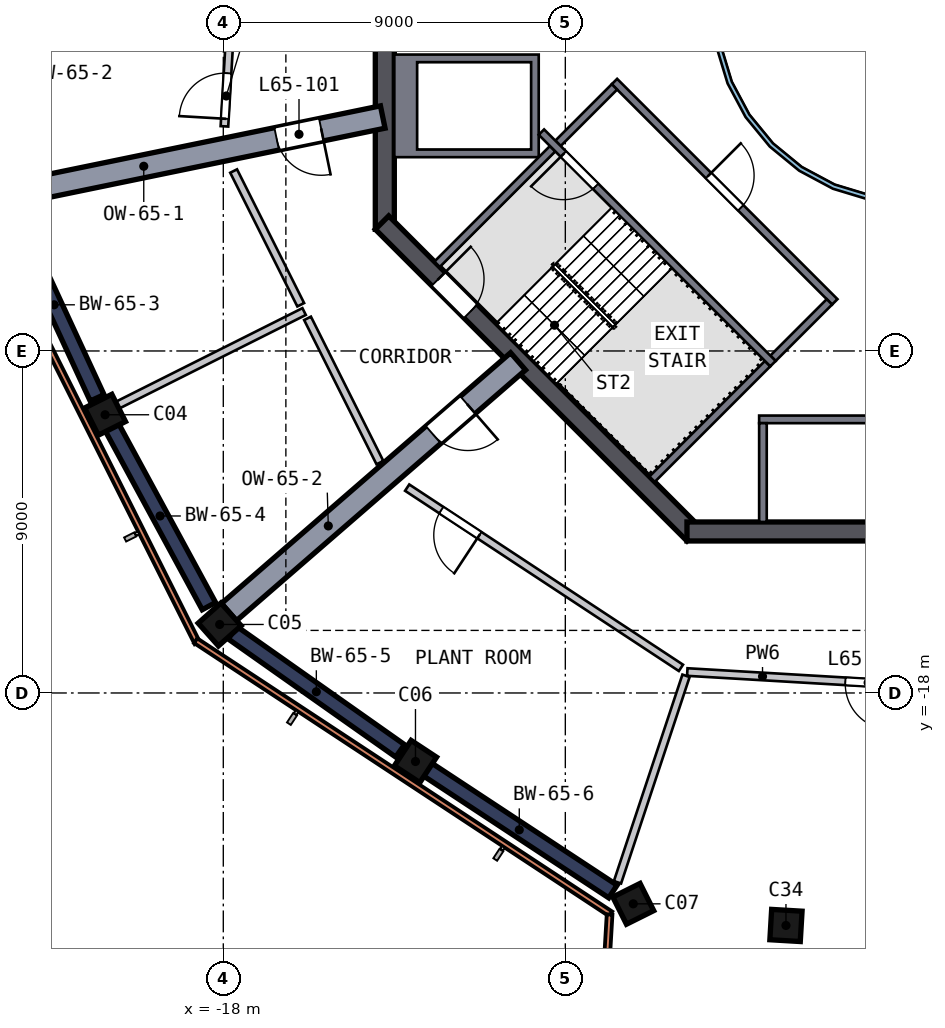
"""IFC4 building model, lengths in metres.
Left out: names, types, materials, properties, quantities, classifications, styles, units other than length and angle.
Written with IfcOpenShell. Run it as: python <this file> out.ifc"""

import sys

from ifc_helpers import new_model, si_unit, direction, frame, frame_2d, origin, origin_2d, place, context, subcontext, project, spatial, polyline, rectangle, outline, extrude, element, fill, save


model = new_model("IFC4")
c1 = context("Model", 3, precision=1e-05, world=origin(), true_north=direction((0.0, 1.0)))
c2 = subcontext(c1, "Body", "Model", "MODEL_VIEW")
j1 = project(units=[si_unit("LENGTHUNIT", "METRE"), si_unit("PLANEANGLEUNIT", "RADIAN")], contexts=[c1])
p1 = place(None, origin())
s1 = spatial("IfcSite", under=j1, at=p1, CompositionType="ELEMENT")
p2 = place(p1, origin())
s2 = spatial("IfcBuilding", under=s1, at=p2, CompositionType="ELEMENT")
p3 = place(p2, frame((0.0, 0.0, 263.0)))
s3 = spatial("IfcBuildingStorey", under=s2, at=p3, CompositionType="ELEMENT", Elevation=263.0)
p4 = place(p3, frame((-21.147, -10.608, 0.0), z_axis=(0.03004517, -0.058682818, 0.997824441), x_axis=(0.447253105, -0.891974541, -0.065924798)))
e1 = element("IfcColumn", 1, at=p4, inside=s3, PredefinedType="COLUMN", context=c2, shape_type="SweptSolid", body=[
    extrude(rectangle(XDim=0.8, YDim=0.8, at=origin_2d()), origin(), (0.0, 0.0, 1.0), 4.51),
])
p5 = place(p3, frame((-18.15, -16.137, 0.0), z_axis=(0.045360282, -0.050177782, 0.997709695), x_axis=(-0.662810667, 0.745725805, 0.06763906)))
e2 = element("IfcColumn", 2, at=p5, inside=s3, PredefinedType="COLUMN", context=c2, shape_type="SweptSolid", body=[
    extrude(rectangle(XDim=0.8, YDim=0.8, at=origin_2d()), origin(), (0.0, 0.0, 1.0), 4.51),
])
p6 = place(p3, frame((-13.01, -19.76, 0.0), z_axis=(0.055380526, -0.035783507, 0.997823901), x_axis=(0.833509154, -0.548557504, -0.065932963)))
e3 = element("IfcColumn", 3, at=p6, inside=s3, PredefinedType="COLUMN", context=c2, shape_type="SweptSolid", body=[
    extrude(rectangle(XDim=0.8, YDim=0.8, at=origin_2d()), origin(), (0.0, 0.0, 1.0), 4.51),
])
p7 = place(p3, frame((-7.291, -23.525, 0.0), z_axis=(0.065708422, -0.019809953, 0.997642205), x_axis=(-0.445205998, 0.894189701, 0.047078641)))
e4 = element("IfcColumn", 4, at=p7, inside=s3, PredefinedType="COLUMN", context=c2, shape_type="SweptSolid", body=[
    extrude(rectangle(XDim=0.8, YDim=0.8, at=origin_2d()), origin(), (0.0, 0.0, 1.0), 4.511),
])
p8 = place(p3, frame((-3.275, -24.108, 0.0), z_axis=(0.067227899, -0.008552341, 0.997700991), x_axis=(-0.058810987, -0.998258564, -0.004594271)))
e5 = element("IfcColumn", 5, at=p8, inside=s3, PredefinedType="COLUMN", context=c2, shape_type="SweptSolid", body=[
    extrude(rectangle(XDim=0.8, YDim=0.8, at=origin_2d()), origin(), (0.0, 0.0, 1.0), 4.51),
])
p9 = place(p3, frame((-13.75, 5.799, 0.0), z_axis=(0.0, 0.0, 1.0), x_axis=(0.0, -1.0, 0.0)))
e6 = element("IfcWall", 6, at=p9, inside=s3, PredefinedType="SHEAR", context=c2, shape_type="SweptSolid", body=[
    extrude(rectangle(XDim=11.598, YDim=0.5, at=frame_2d((5.799, 0.0))), origin(), (0.0, 0.0, 1.0), 6.0),
])
p10 = place(p9, frame((4.899, 0.0, 0.0)))
e7 = element("IfcOpeningElement", 7, at=p10, cuts=e6, PredefinedType="OPENING", context=c2, shape_type="SweptSolid", body=[
    extrude(rectangle(XDim=1.8, YDim=2.1, at=frame_2d((0.9, 1.05))), frame((0.0, 0.26, 0.0), z_axis=(0.0, -1.0, 0.0), x_axis=(1.0, 0.0, 0.0)), (0.0, 0.0, 1.0), 0.52),
])
p11 = place(p3, frame((-13.823, -5.622, 0.0), z_axis=(0.0, 0.0, 1.0), x_axis=(0.707106781, -0.707106781, 0.0)))
e8 = element("IfcWall", 8, at=p11, inside=s3, PredefinedType="SHEAR", context=c2, shape_type="SweptSolid", body=[
    extrude(rectangle(XDim=11.598, YDim=0.5, at=frame_2d((5.799, 0.0))), origin(), (0.0, 0.0, 1.0), 6.0),
])
p12 = place(p11, frame((2.099, 0.0, 0.0)))
e9 = element("IfcOpeningElement", 9, at=p12, cuts=e8, PredefinedType="OPENING", context=c2, shape_type="SweptSolid", body=[
    extrude(rectangle(XDim=1.2, YDim=2.1, at=frame_2d((0.6, 1.05))), frame((0.0, 0.26, 0.0), z_axis=(0.0, -1.0, 0.0), x_axis=(1.0, 0.0, 0.0)), (0.0, 0.0, 1.0), 0.52),
])
p13 = place(p3, frame((-5.799, -13.75, 0.0), z_axis=(0.0, 0.0, 1.0), x_axis=(1.0, 0.0, 0.0)))
e10 = element("IfcWall", 10, at=p13, inside=s3, PredefinedType="SHEAR", context=c2, shape_type="SweptSolid", body=[
    extrude(rectangle(XDim=11.598, YDim=0.5, at=frame_2d((5.799, 0.0))), origin(), (0.0, 0.0, 1.0), 6.0),
])
p14 = place(p3, frame((-23.585, -5.336, 0.0), z_axis=(0.0, 0.0, 1.0), x_axis=(0.419749551, -0.90763997, 0.0)))
e11 = element("IfcWall", 11, at=p14, inside=s3, PredefinedType="SHEAR", context=c2, shape_type="SweptSolid", body=[
    extrude(rectangle(XDim=5.396, YDim=0.4, at=frame_2d((2.698, 0.0))), origin(), (0.0, 0.0, 1.0), 4.5),
])
p15 = place(p3, frame((-20.95, -10.971, 0.0), z_axis=(0.0, 0.0, 1.0), x_axis=(0.476596513, -0.879122155, 0.0)))
e12 = element("IfcWall", 12, at=p15, inside=s3, PredefinedType="SHEAR", context=c2, shape_type="SweptSolid", body=[
    extrude(rectangle(XDim=5.396, YDim=0.4, at=frame_2d((2.698, 0.0))), origin(), (0.0, 0.0, 1.0), 4.5),
])
p16 = place(p3, frame((-17.757, -16.414, 0.0), z_axis=(0.0, 0.0, 1.0), x_axis=(0.817331344, -0.576167922, 0.0)))
e13 = element("IfcWall", 13, at=p16, inside=s3, PredefinedType="SHEAR", context=c2, shape_type="SweptSolid", body=[
    extrude(rectangle(XDim=5.396, YDim=0.4, at=frame_2d((2.698, 0.0))), origin(), (0.0, 0.0, 1.0), 4.5),
])
p17 = place(p3, frame((-12.676, -19.98, 0.0), z_axis=(0.0, 0.0, 1.0), x_axis=(0.835226029, -0.549906792, 0.0)))
e14 = element("IfcWall", 14, at=p17, inside=s3, PredefinedType="SHEAR", context=c2, shape_type="SweptSolid", body=[
    extrude(rectangle(XDim=5.9, YDim=0.4, at=frame_2d((2.95, 0.0))), origin(), (0.0, 0.0, 1.0), 4.5),
])
p18 = place(p3, frame((-13.804, -2.844, 0.0), z_axis=(0.0, 0.0, 1.0), x_axis=(-0.979429804, -0.201785179, 0.0)))
e15 = element("IfcWall", 15, at=p18, inside=s3, PredefinedType="SHEAR", context=c2, shape_type="SweptSolid", body=[
    extrude(rectangle(XDim=9.792, YDim=0.6, at=frame_2d((4.896, 0.0))), origin(), (0.0, 0.0, 1.0), 4.5),
])
p19 = place(p18, frame((1.65, 0.0, 0.0)))
e16 = element("IfcOpeningElement", 16, at=p19, cuts=e15, PredefinedType="OPENING", context=c2, shape_type="SweptSolid", body=[
    extrude(rectangle(XDim=1.2, YDim=2.1, at=frame_2d((0.6, 1.05))), frame((0.0, 0.31, 0.0), z_axis=(0.0, -1.0, 0.0), x_axis=(1.0, 0.0, 0.0)), (0.0, 0.0, 1.0), 0.62),
])
p20 = place(p3, frame((-10.243, -9.273, 0.0), z_axis=(0.0, 0.0, 1.0), x_axis=(-0.755466645, -0.65518711, 0.0)))
e17 = element("IfcWall", 17, at=p20, inside=s3, PredefinedType="SHEAR", context=c2, shape_type="SweptSolid", body=[
    extrude(rectangle(XDim=10.07, YDim=0.6, at=frame_2d((5.035, 0.0))), origin(), (0.0, 0.0, 1.0), 4.5),
])
p21 = place(p20, frame((1.75, 0.0, 0.0)))
e18 = element("IfcOpeningElement", 18, at=p21, cuts=e17, PredefinedType="OPENING", context=c2, shape_type="SweptSolid", body=[
    extrude(rectangle(XDim=1.2, YDim=2.1, at=frame_2d((0.6, 1.05))), frame((0.0, 0.31, 0.0), z_axis=(0.0, -1.0, 0.0), x_axis=(1.0, 0.0, 0.0)), (0.0, 0.0, 1.0), 0.62),
])
p22 = place(p3, frame((-24.531, -5.033, 0.0), z_axis=(0.0, 0.0, 1.0), x_axis=(0.448374471, -0.893845811, 0.0)))
e19 = element("IfcWall", 19, at=p22, inside=s3, PredefinedType="SOLIDWALL", context=c2, shape_type="SweptSolid", body=[
    extrude(rectangle(XDim=13.035, YDim=0.15, at=frame_2d((6.518, 0.0))), origin(), (0.0, 0.0, 1.0), 4.5),
])
p23 = place(p3, frame((-18.727, -16.624, 0.0), z_axis=(0.0, 0.0, 1.0), x_axis=(0.835230898, -0.549899397, 0.0)))
e20 = element("IfcWall", 20, at=p23, inside=s3, PredefinedType="SOLIDWALL", context=c2, shape_type="SweptSolid", body=[
    extrude(rectangle(XDim=13.075, YDim=0.15, at=frame_2d((6.538, 0.0))), origin(), (0.0, 0.0, 1.0), 4.5),
])
p24 = place(p3, frame((-7.835, -23.828, 0.0), z_axis=(0.0, 0.0, 1.0), x_axis=(-0.058609049, -0.998281012, 0.0)))
e21 = element("IfcWall", 21, at=p24, inside=s3, PredefinedType="SOLIDWALL", context=c2, shape_type="SweptSolid", body=[
    extrude(rectangle(XDim=12.922, YDim=0.15, at=frame_2d((6.461, 0.0))), origin(), (0.0, 0.0, 1.0), 4.5),
])
p25 = place(p3, origin())
e22 = element("IfcWall", 22, at=p25, inside=s3, PredefinedType="SOLIDWALL", context=c2, shape_type="SweptSolid", body=[
    extrude(outline(polyline([(-9.7, -3.9), (-13.5, -3.9), (-13.5, -1.2), (-9.7, -1.2), (-9.7, -3.9)]), holes=[polyline([(-12.9, -1.4), (-12.9, -3.7), (-9.9, -3.7), (-9.9, -1.4), (-12.9, -1.4)])]), origin(), (0.0, 0.0, 1.0), 5.55),
])
p26 = place(p3, frame((-3.9, -10.8, 0.0), z_axis=(0.0, 0.0, 1.0), x_axis=(1.0, 0.0, 0.0)))
e23 = element("IfcWall", 23, at=p26, inside=s3, PredefinedType="SOLIDWALL", context=c2, shape_type="SweptSolid", body=[
    extrude(rectangle(XDim=7.8, YDim=0.2, at=frame_2d((3.9, 0.0))), origin(), (0.0, 0.0, 1.0), 5.55),
])
p27 = place(p26, frame((3.45, 0.0, 0.0)))
e24 = element("IfcOpeningElement", 24, at=p27, cuts=e23, PredefinedType="OPENING", context=c2, shape_type="SweptSolid", body=[
    extrude(rectangle(XDim=0.9, YDim=2.1, at=frame_2d((0.45, 1.05))), frame((0.0, 0.11, 0.0), z_axis=(0.0, -1.0, 0.0), x_axis=(1.0, 0.0, 0.0)), (0.0, 0.0, 1.0), 0.22),
])
p28 = place(p3, frame((-3.8, -10.9, 0.0), z_axis=(0.0, 0.0, 1.0), x_axis=(0.0, -1.0, 0.0)))
e25 = element("IfcWall", 25, at=p28, inside=s3, PredefinedType="SOLIDWALL", context=c2, shape_type="SweptSolid", body=[
    extrude(rectangle(XDim=2.6, YDim=0.2, at=frame_2d((1.3, 0.0))), origin(), (0.0, 0.0, 1.0), 5.55),
])
p29 = place(p3, frame((-3.535, -9.334, 0.0), z_axis=(0.0, 0.0, 1.0), x_axis=(-0.707120946, 0.707092617, 0.0)))
e26 = element("IfcWall", 26, at=p29, inside=s3, PredefinedType="SOLIDWALL", context=c2, shape_type="SweptSolid", body=[
    extrude(rectangle(XDim=8.618, YDim=0.2, at=frame_2d((4.309, 0.0))), origin(), (0.0, 0.0, 1.0), 5.55),
])
p30 = place(p29, frame((6.6, 0.0, 0.0)))
e27 = element("IfcOpeningElement", 27, at=p30, cuts=e26, PredefinedType="OPENING", context=c2, shape_type="SweptSolid", body=[
    extrude(rectangle(XDim=1.2, YDim=2.1, at=frame_2d((0.6, 1.05))), frame((0.0, 0.11, 0.0), z_axis=(0.0, -1.0, 0.0), x_axis=(1.0, 0.0, 0.0)), (0.0, 0.0, 1.0), 0.22),
])
for number, where, z_axis, x_axis in (
    (28, (-9.334, -3.677, 0.0), (0.0, 0.0, 1.0), (-0.707, -0.707, 0.0)),
    (29, (-3.677, -9.334, 0.0), (0.0, 0.0, 1.0), (-0.707, -0.707, 0.0)),
):
    element("IfcWall", number, at=place(p3, frame(where, z_axis=z_axis, x_axis=x_axis)), inside=s3, PredefinedType="SOLIDWALL", context=c2, shape_type="SweptSolid", body=[
        extrude(rectangle(XDim=4.3, YDim=0.2, at=frame_2d((2.15, 0.0))), origin(), (0.0, 0.0, 1.0), 5.55),
    ])
p31 = place(p3, frame((-7.708, -1.909, 0.0), z_axis=(0.0, 0.0, 1.0), x_axis=(0.707106781, -0.707106781, 0.0)))
e30 = element("IfcWall", 30, at=p31, inside=s3, PredefinedType="SOLIDWALL", context=c2, shape_type="SweptSolid", body=[
    extrude(rectangle(XDim=8.2, YDim=0.2, at=frame_2d((4.1, 0.0))), origin(), (0.0, 0.0, 1.0), 5.55),
])
p32 = place(p31, frame((3.5, 0.0, 0.0)))
e31 = element("IfcOpeningElement", 31, at=p32, cuts=e30, PredefinedType="OPENING", context=c2, shape_type="SweptSolid", body=[
    extrude(rectangle(XDim=1.2, YDim=2.1, at=frame_2d((0.6, 1.05))), frame((0.0, 0.11, 0.0), z_axis=(0.0, -1.0, 0.0), x_axis=(1.0, 0.0, 0.0)), (0.0, 0.0, 1.0), 0.22),
])
for number, where, z_axis, x_axis in (
    (32, (-7.708, -2.051, 0.0), (0.0, 0.0, 1.0), (-0.707, -0.707, 0.0)),
    (33, (-2.051, -7.708, 0.0), (0.0, 0.0, 1.0), (-0.707, -0.707, 0.0)),
):
    element("IfcWall", number, at=place(p3, frame(where, z_axis=z_axis, x_axis=x_axis)), inside=s3, PredefinedType="SOLIDWALL", context=c2, shape_type="SweptSolid", body=[
        extrude(rectangle(XDim=2.1, YDim=0.2, at=frame_2d((1.05, 0.0))), origin(), (0.0, 0.0, 1.0), 5.55),
    ])
p33 = place(p3, origin())
e34 = element("IfcWall", 34, at=p33, inside=s3, PredefinedType="SOLIDWALL", context=c2, shape_type="SweptSolid", body=[
    extrude(outline(polyline([(5.021, -0.999), (4.73, -1.959), (4.257, -2.844), (3.62, -3.62), (2.844, -4.257), (1.959, -4.73), (0.999, -5.021), (0.0, -5.12), (-0.999, -5.021), (-1.959, -4.73), (-2.844, -4.257), (-3.62, -3.62), (-4.257, -2.844), (-4.73, -1.959), (-5.021, -0.999), (-5.12, 0.0), (-5.021, 0.999), (-4.73, 1.959), (-4.257, 2.844), (-3.62, 3.62), (-2.844, 4.257), (-1.959, 4.73), (-0.999, 5.021), (0.0, 5.12), (0.999, 5.021), (1.959, 4.73), (2.844, 4.257), (3.62, 3.62), (4.257, 2.844), (4.73, 1.959), (5.021, 0.999), (5.12, 0.0), (5.021, -0.999)]), holes=[polyline([(4.904, 0.976), (4.619, 1.913), (4.157, 2.778), (3.535, 3.535), (2.778, 4.157), (1.913, 4.619), (0.976, 4.904), (0.0, 5.0), (-0.976, 4.904), (-1.913, 4.619), (-2.778, 4.157), (-3.535, 3.535), (-4.157, 2.778), (-4.619, 1.913), (-4.904, 0.976), (-5.0, 0.0), (-4.904, -0.976), (-4.619, -1.913), (-4.157, -2.778), (-3.535, -3.535), (-2.778, -4.157), (-1.913, -4.619), (-0.976, -4.904), (0.0, -5.0), (0.976, -4.904), (1.913, -4.619), (2.778, -4.157), (3.535, -3.535), (4.157, -2.778), (4.619, -1.913), (4.904, -0.976), (5.0, 0.0), (4.904, 0.976)])]), origin(), (0.0, 0.0, 1.0), 5.55),
])
p34 = place(p3, frame((-15.873, -7.963, 0.0), z_axis=(0.0, 0.0, 1.0), x_axis=(-0.893842016, -0.448382037, 0.0)))
e35 = element("IfcWall", 35, at=p34, inside=s3, PredefinedType="SOLIDWALL", context=c2, shape_type="SweptSolid", body=[
    extrude(rectangle(XDim=6.35, YDim=0.2, at=frame_2d((3.175, 0.0))), origin(), (0.0, 0.0, 1.0), 4.5),
])
p35 = place(p3, frame((-17.97, -3.089, 0.0), z_axis=(0.0, 0.0, 1.0), x_axis=(0.05859974, 0.998281559, 0.0)))
e36 = element("IfcWall", 36, at=p35, inside=s3, PredefinedType="SOLIDWALL", context=c2, shape_type="SweptSolid", body=[
    extrude(rectangle(XDim=8.895, YDim=0.2, at=frame_2d((4.448, 0.0))), origin(), (0.0, 0.0, 1.0), 4.5),
])
p36 = place(p35, frame((0.2, 0.0, 0.0)))
e37 = element("IfcOpeningElement", 37, at=p36, cuts=e36, PredefinedType="OPENING", context=c2, shape_type="SweptSolid", body=[
    extrude(rectangle(XDim=1.2, YDim=2.1, at=frame_2d((0.6, 1.05))), frame((0.0, 0.11, 0.0), z_axis=(0.0, -1.0, 0.0), x_axis=(1.0, 0.0, 0.0)), (0.0, 0.0, 1.0), 0.22),
])
p37 = place(p3, frame((-17.728, -4.265, 0.0), z_axis=(0.0, 0.0, 1.0), x_axis=(0.448329575, -0.893868331, 0.0)))
e38 = element("IfcWall", 38, at=p37, inside=s3, PredefinedType="SOLIDWALL", context=c2, shape_type="SweptSolid", body=[
    extrude(rectangle(XDim=3.937, YDim=0.2, at=frame_2d((1.968, 0.0))), origin(), (0.0, 0.0, 1.0), 4.5),
])
p38 = place(p3, frame((-15.783, -8.141, 0.0), z_axis=(0.0, 0.0, 1.0), x_axis=(0.448385612, -0.893840223, 0.0)))
e39 = element("IfcWall", 39, at=p38, inside=s3, PredefinedType="SOLIDWALL", context=c2, shape_type="SweptSolid", body=[
    extrude(rectangle(XDim=4.248, YDim=0.2, at=frame_2d((2.124, 0.0))), origin(), (0.0, 0.0, 1.0), 4.5),
])
p39 = place(p3, frame((-5.958, -17.339, 0.0), z_axis=(0.0, 0.0, 1.0), x_axis=(-0.835241577, 0.549883176, 0.0)))
e40 = element("IfcWall", 40, at=p39, inside=s3, PredefinedType="SOLIDWALL", context=c2, shape_type="SweptSolid", body=[
    extrude(rectangle(XDim=8.625, YDim=0.2, at=frame_2d((4.312, 0.0))), origin(), (0.0, 0.0, 1.0), 4.5),
])
p40 = place(p39, frame((6.35, 0.0, 0.0)))
e41 = element("IfcOpeningElement", 41, at=p40, cuts=e40, PredefinedType="OPENING", context=c2, shape_type="SweptSolid", body=[
    extrude(rectangle(XDim=1.2, YDim=2.1, at=frame_2d((0.6, 1.05))), frame((0.0, 0.11, 0.0), z_axis=(0.0, -1.0, 0.0), x_axis=(1.0, 0.0, 0.0)), (0.0, 0.0, 1.0), 0.22),
])
p41 = place(p3, frame((-5.823, -17.547, 0.0), z_axis=(0.0, 0.0, 1.0), x_axis=(-0.315012313, -0.949087584, 0.0)))
e42 = element("IfcWall", 42, at=p41, inside=s3, PredefinedType="SOLIDWALL", context=c2, shape_type="SweptSolid", body=[
    extrude(rectangle(XDim=5.726, YDim=0.2, at=frame_2d((2.863, 0.0))), origin(), (0.0, 0.0, 1.0), 4.5),
])
p42 = place(p3, frame((3.51, -17.995, 0.0), z_axis=(0.0, 0.0, 1.0), x_axis=(-0.998280332, 0.058620635, 0.0)))
e43 = element("IfcWall", 43, at=p42, inside=s3, PredefinedType="SOLIDWALL", context=c2, shape_type="SweptSolid", body=[
    extrude(rectangle(XDim=9.317, YDim=0.2, at=frame_2d((4.658, 0.0))), origin(), (0.0, 0.0, 1.0), 4.5),
])
p43 = place(p42, frame((3.95, 0.0, 0.0)))
e44 = element("IfcOpeningElement", 44, at=p43, cuts=e43, PredefinedType="OPENING", context=c2, shape_type="SweptSolid", body=[
    extrude(rectangle(XDim=1.2, YDim=2.1, at=frame_2d((0.6, 1.05))), frame((0.0, 0.11, 0.0), z_axis=(0.0, -1.0, 0.0), x_axis=(1.0, 0.0, 0.0)), (0.0, 0.0, 1.0), 0.22),
])
p44 = place(p30, origin())
e45 = element("IfcDoor", 45, at=p44, inside=s3, OperationType="SINGLE_SWING_RIGHT", PredefinedType="DOOR", context=c2, shape_type="SweptSolid", body=[
    extrude(rectangle(XDim=1.2, YDim=2.1, at=frame_2d((0.6, 1.05))), frame((0.0, 0.025, 0.0), z_axis=(0.0, -1.0, 0.0), x_axis=(1.0, 0.0, 0.0)), (0.0, 0.0, 1.0), 0.05),
])
fill(e27, e45)
p45 = place(p12, origin())
e46 = element("IfcDoor", 46, at=p45, inside=s3, OperationType="SINGLE_SWING_LEFT", PredefinedType="DOOR", context=c2, shape_type="SweptSolid", body=[
    extrude(rectangle(XDim=1.2, YDim=2.1, at=frame_2d((0.6, 1.05))), frame((0.0, 0.025, 0.0), z_axis=(0.0, -1.0, 0.0), x_axis=(1.0, 0.0, 0.0)), (0.0, 0.0, 1.0), 0.05),
])
fill(e9, e46)
p46 = place(p32, origin())
e47 = element("IfcDoor", 47, at=p46, inside=s3, OperationType="SINGLE_SWING_LEFT", PredefinedType="DOOR", context=c2, shape_type="SweptSolid", body=[
    extrude(rectangle(XDim=1.2, YDim=2.1, at=frame_2d((0.6, 1.05))), frame((0.0, 0.025, 0.0), z_axis=(0.0, -1.0, 0.0), x_axis=(1.0, 0.0, 0.0)), (0.0, 0.0, 1.0), 0.05),
])
fill(e31, e47)
p47 = place(p19, origin())
e48 = element("IfcDoor", 48, at=p47, inside=s3, OperationType="SINGLE_SWING_LEFT", PredefinedType="DOOR", context=c2, shape_type="SweptSolid", body=[
    extrude(rectangle(XDim=1.2, YDim=2.1, at=frame_2d((0.6, 1.05))), frame((0.0, 0.025, 0.0), z_axis=(0.0, -1.0, 0.0), x_axis=(1.0, 0.0, 0.0)), (0.0, 0.0, 1.0), 0.05),
])
fill(e16, e48)
p48 = place(p21, origin())
e49 = element("IfcDoor", 49, at=p48, inside=s3, OperationType="SINGLE_SWING_LEFT", PredefinedType="DOOR", context=c2, shape_type="SweptSolid", body=[
    extrude(rectangle(XDim=1.2, YDim=2.1, at=frame_2d((0.6, 1.05))), frame((0.0, 0.025, 0.0), z_axis=(0.0, -1.0, 0.0), x_axis=(1.0, 0.0, 0.0)), (0.0, 0.0, 1.0), 0.05),
])
fill(e18, e49)
p49 = place(p36, origin())
e50 = element("IfcDoor", 50, at=p49, inside=s3, OperationType="SINGLE_SWING_LEFT", PredefinedType="DOOR", context=c2, shape_type="SweptSolid", body=[
    extrude(rectangle(XDim=1.2, YDim=2.1, at=frame_2d((0.6, 1.05))), frame((0.0, 0.025, 0.0), z_axis=(0.0, -1.0, 0.0), x_axis=(1.0, 0.0, 0.0)), (0.0, 0.0, 1.0), 0.05),
])
fill(e37, e50)
p50 = place(p40, origin())
e51 = element("IfcDoor", 51, at=p50, inside=s3, OperationType="SINGLE_SWING_LEFT", PredefinedType="DOOR", context=c2, shape_type="SweptSolid", body=[
    extrude(rectangle(XDim=1.2, YDim=2.1, at=frame_2d((0.6, 1.05))), frame((0.0, 0.025, 0.0), z_axis=(0.0, -1.0, 0.0), x_axis=(1.0, 0.0, 0.0)), (0.0, 0.0, 1.0), 0.05),
])
fill(e41, e51)
p51 = place(p43, origin())
e52 = element("IfcDoor", 52, at=p51, inside=s3, OperationType="SINGLE_SWING_LEFT", PredefinedType="DOOR", context=c2, shape_type="SweptSolid", body=[
    extrude(rectangle(XDim=1.2, YDim=2.1, at=frame_2d((0.6, 1.05))), frame((0.0, 0.025, 0.0), z_axis=(0.0, -1.0, 0.0), x_axis=(1.0, 0.0, 0.0)), (0.0, 0.0, 1.0), 0.05),
])
fill(e44, e52)
save(model, sys.argv[1])
